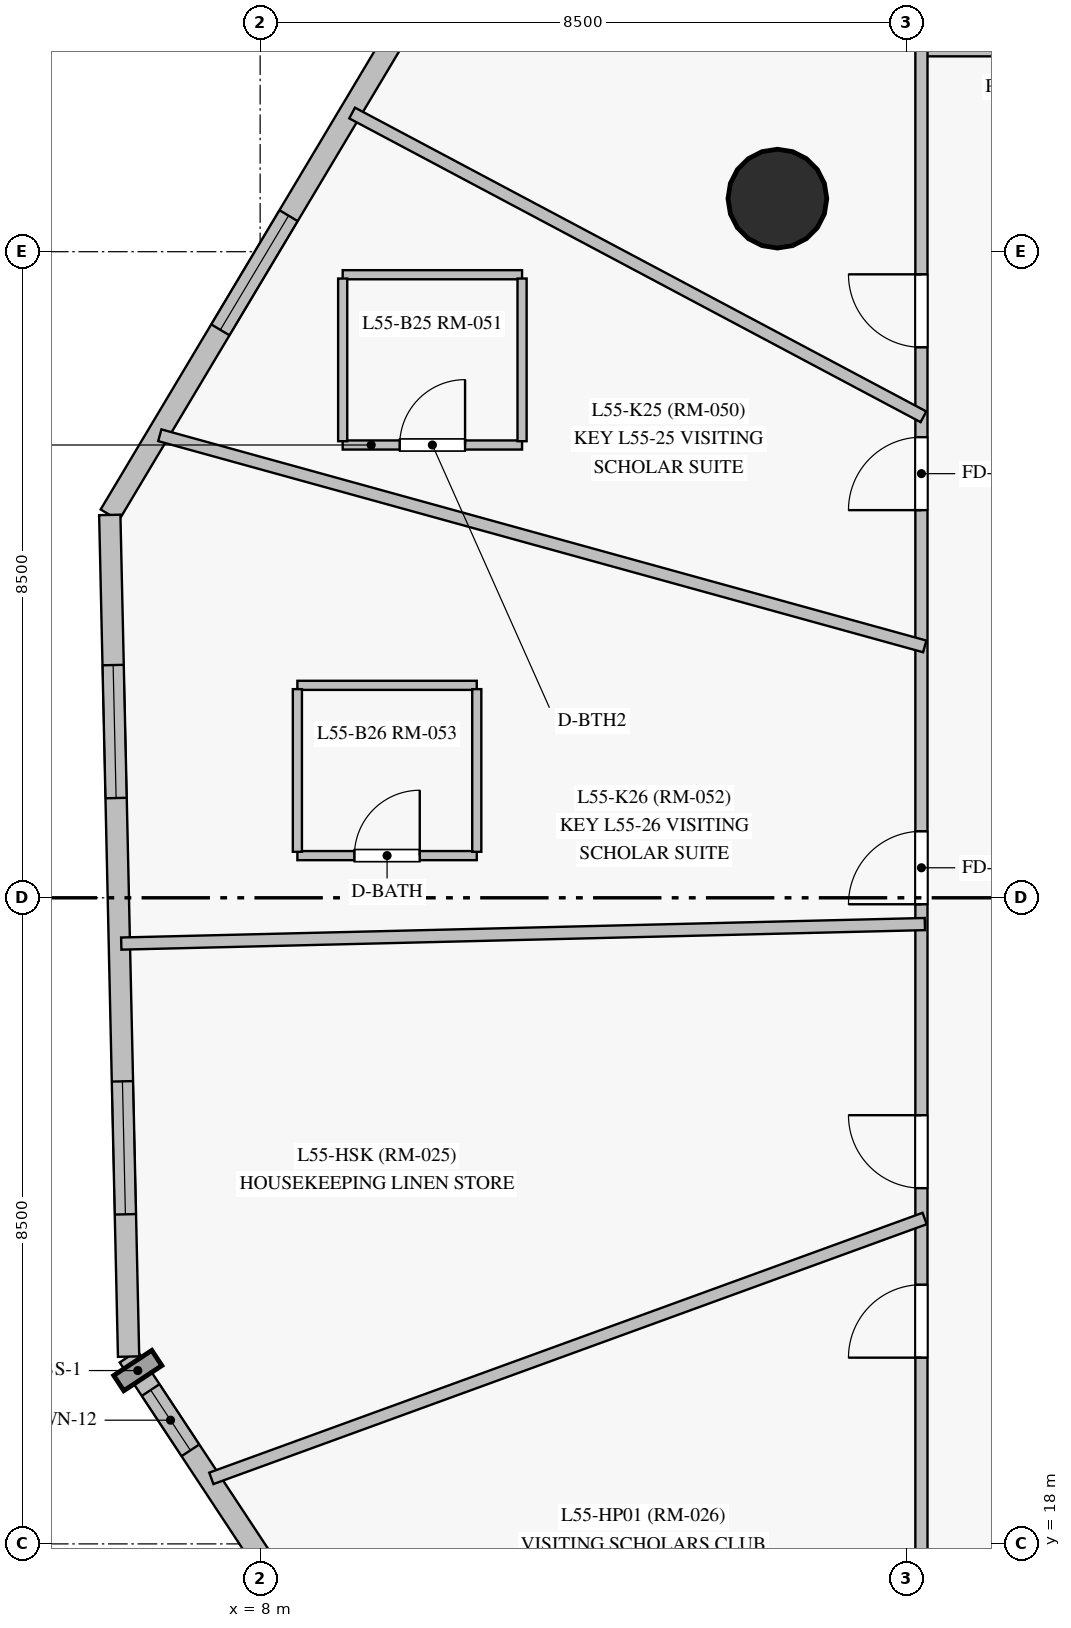
"""IFC4 building model, lengths in metres.
Left out: names, types, materials, properties, quantities, classifications, styles, units other than length and angle.
Written with IfcOpenShell. Run it as: python <this file> out.ifc"""

import sys

from ifc_helpers import new_model, si_unit, direction, frame, frame_2d, origin, origin_with_axes, origin_2d, place, context, subcontext, project, spatial, rectangle, circle, extrude, source, transform, mapped, element, fill, save


model = new_model("IFC4")
c1 = context("Model", 3, precision=1e-05, world=origin(), true_north=direction((0.0, 1.0)))
c2 = subcontext(c1, "Body", "Model", "MODEL_VIEW")
j1 = project(units=[si_unit("LENGTHUNIT", "METRE"), si_unit("PLANEANGLEUNIT", "RADIAN")], contexts=[c1])
p1 = place(None, origin())
s1 = spatial("IfcSite", under=j1, at=p1, CompositionType="ELEMENT")
p2 = place(p1, origin())
s2 = spatial("IfcBuilding", under=s1, at=p2, CompositionType="ELEMENT")
p3 = place(p2, frame((0.0, 0.0, 190.1)))
s3 = spatial("IfcBuildingStorey", under=s2, at=p3, CompositionType="ELEMENT", Elevation=190.1)
m1 = source(origin_with_axes(), c2, "Body", "SweptSolid", [
    extrude(circle(Radius=0.65, at=origin_2d()), origin(), (0.0, 0.0, 1.0), 3.05),
])
p4 = place(p3, frame((14.805, 35.698, 0.0), z_axis=(0.0, 0.0, 1.0), x_axis=(1.0, 0.0, 0.0)))
e1 = element("IfcColumn", 1, at=p4, inside=s3, PredefinedType="COLUMN", context=c2, shape_type="MappedRepresentation", body=[
    mapped(m1, transform((0.0, 0.0, 0.0), scale=1.0)),
])
p5 = place(p3, frame((6.269, 20.464, 0.0), z_axis=(0.0, 0.0, 1.0), x_axis=(0.550716639054, -0.834692268725, 0.0)))
e2 = element("IfcWall", 2, at=p5, inside=s3, PredefinedType="SOLIDWALL", context=c2, shape_type="SweptSolid", body=[
    extrude(rectangle(XDim=14.194, YDim=0.28, at=frame_2d((7.097, 0.0))), origin(), (0.0, 0.0, 1.0), 2.825),
])
p6 = place(p5, frame((0.527, 0.0, 0.85)))
e3 = element("IfcOpeningElement", 3, at=p6, cuts=e2, PredefinedType="OPENING", context=c2, shape_type="SweptSolid", body=[
    extrude(rectangle(XDim=0.95, YDim=1.5, at=frame_2d((0.475, 0.75))), frame((0.0, 0.15, 0.0), z_axis=(0.0, -1.0, 0.0), x_axis=(1.0, 0.0, 0.0)), (0.0, 0.0, 1.0), 0.3),
])
p7 = place(p5, frame((4.5, 0.0, 0.85)))
e4 = element("IfcOpeningElement", 4, at=p7, cuts=e2, PredefinedType="OPENING", context=c2, shape_type="SweptSolid", body=[
    extrude(rectangle(XDim=1.75, YDim=1.65, at=frame_2d((0.875, 0.825))), frame((0.0, 0.15, 0.0), z_axis=(0.0, -1.0, 0.0), x_axis=(1.0, 0.0, 0.0)), (0.0, 0.0, 1.0), 0.3),
])
p8 = place(p5, frame((10.594, 0.0, 0.85)))
e5 = element("IfcOpeningElement", 5, at=p8, cuts=e2, PredefinedType="OPENING", context=c2, shape_type="SweptSolid", body=[
    extrude(rectangle(XDim=1.75, YDim=1.65, at=frame_2d((0.875, 0.825))), frame((0.0, 0.15, 0.0), z_axis=(0.0, -1.0, 0.0), x_axis=(1.0, 0.0, 0.0)), (0.0, 0.0, 1.0), 0.3),
])
p9 = place(p3, frame((13.302, 43.722, 0.0), z_axis=(0.0, 0.0, 1.0), x_axis=(-0.512903816994, -0.858446081308, 0.0)))
e6 = element("IfcWall", 6, at=p9, inside=s3, PredefinedType="SOLIDWALL", context=c2, shape_type="SweptSolid", body=[
    extrude(rectangle(XDim=14.194, YDim=0.28, at=frame_2d((7.097, 0.0))), origin(), (0.0, 0.0, 1.0), 2.825),
])
p10 = place(p9, frame((1.334, 0.0, 0.85)))
e7 = element("IfcOpeningElement", 7, at=p10, cuts=e6, PredefinedType="OPENING", context=c2, shape_type="SweptSolid", body=[
    extrude(rectangle(XDim=1.75, YDim=1.65, at=frame_2d((0.875, 0.825))), frame((0.0, 0.15, 0.0), z_axis=(0.0, -1.0, 0.0), x_axis=(1.0, 0.0, 0.0)), (0.0, 0.0, 1.0), 0.3),
])
p11 = place(p9, frame((4.993, 0.0, 0.85)))
e8 = element("IfcOpeningElement", 8, at=p11, cuts=e6, PredefinedType="OPENING", context=c2, shape_type="SweptSolid", body=[
    extrude(rectangle(XDim=1.75, YDim=1.65, at=frame_2d((0.875, 0.825))), frame((0.0, 0.15, 0.0), z_axis=(0.0, -1.0, 0.0), x_axis=(1.0, 0.0, 0.0)), (0.0, 0.0, 1.0), 0.3),
])
p12 = place(p9, frame((9.608, 0.0, 0.85)))
e9 = element("IfcOpeningElement", 9, at=p12, cuts=e6, PredefinedType="OPENING", context=c2, shape_type="SweptSolid", body=[
    extrude(rectangle(XDim=1.75, YDim=1.65, at=frame_2d((0.875, 0.825))), frame((0.0, 0.15, 0.0), z_axis=(0.0, -1.0, 0.0), x_axis=(1.0, 0.0, 0.0)), (0.0, 0.0, 1.0), 0.3),
])
p13 = place(p3, frame((6.022, 31.537, 0.0), z_axis=(0.0, 0.0, 1.0), x_axis=(0.022351376458, -0.999750176779, 0.0)))
e10 = element("IfcWall", 10, at=p13, inside=s3, PredefinedType="SOLIDWALL", context=c2, shape_type="SweptSolid", body=[
    extrude(rectangle(XDim=11.076, YDim=0.28, at=frame_2d((5.538, 0.0))), origin(), (0.0, 0.0, 1.0), 2.825),
])
p14 = place(p13, frame((1.976, 0.0, 0.85)))
e11 = element("IfcOpeningElement", 11, at=p14, cuts=e10, PredefinedType="OPENING", context=c2, shape_type="SweptSolid", body=[
    extrude(rectangle(XDim=1.75, YDim=1.65, at=frame_2d((0.875, 0.825))), frame((0.0, 0.15, 0.0), z_axis=(0.0, -1.0, 0.0), x_axis=(1.0, 0.0, 0.0)), (0.0, 0.0, 1.0), 0.3),
])
p15 = place(p13, frame((7.454, 0.0, 0.85)))
e12 = element("IfcOpeningElement", 12, at=p15, cuts=e10, PredefinedType="OPENING", context=c2, shape_type="SweptSolid", body=[
    extrude(rectangle(XDim=1.75, YDim=1.65, at=frame_2d((0.875, 0.825))), frame((0.0, 0.15, 0.0), z_axis=(0.0, -1.0, 0.0), x_axis=(1.0, 0.0, 0.0)), (0.0, 0.0, 1.0), 0.3),
])
p16 = place(p3, frame((16.7, 37.65, 0.0), z_axis=(0.0, 0.0, 1.0), x_axis=(1.0, 0.0, 0.0)))
e13 = element("IfcWall", 13, at=p16, inside=s3, PredefinedType="PARTITIONING", context=c2, shape_type="SweptSolid", body=[
    extrude(rectangle(XDim=23.5, YDim=0.16, at=frame_2d((11.75, 0.0))), origin(), (0.0, 0.0, 1.0), 2.375),
])
p17 = place(p16, frame((20.285, 0.0, 0.0)))
e14 = element("IfcOpeningElement", 14, at=p17, cuts=e13, PredefinedType="OPENING", context=c2, shape_type="SweptSolid", body=[
    extrude(rectangle(XDim=0.96, YDim=2.15, at=frame_2d((0.48, 1.075))), frame((0.0, 0.09, 0.0), z_axis=(0.0, -1.0, 0.0), x_axis=(1.0, 0.0, 0.0)), (0.0, 0.0, 1.0), 0.18),
])
p18 = place(p16, frame((16.66, 0.0, 0.0)))
e15 = element("IfcOpeningElement", 15, at=p18, cuts=e13, PredefinedType="OPENING", context=c2, shape_type="SweptSolid", body=[
    extrude(rectangle(XDim=0.96, YDim=2.15, at=frame_2d((0.48, 1.075))), frame((0.0, 0.09, 0.0), z_axis=(0.0, -1.0, 0.0), x_axis=(1.0, 0.0, 0.0)), (0.0, 0.0, 1.0), 0.18),
])
p19 = place(p16, frame((13.863, 0.0, 0.0)))
e16 = element("IfcOpeningElement", 16, at=p19, cuts=e13, PredefinedType="OPENING", context=c2, shape_type="SweptSolid", body=[
    extrude(rectangle(XDim=0.96, YDim=2.15, at=frame_2d((0.48, 1.075))), frame((0.0, 0.09, 0.0), z_axis=(0.0, -1.0, 0.0), x_axis=(1.0, 0.0, 0.0)), (0.0, 0.0, 1.0), 0.18),
])
p20 = place(p16, frame((11.965, 0.0, 0.0)))
e17 = element("IfcOpeningElement", 17, at=p20, cuts=e13, PredefinedType="OPENING", context=c2, shape_type="SweptSolid", body=[
    extrude(rectangle(XDim=0.96, YDim=2.15, at=frame_2d((0.48, 1.075))), frame((0.0, 0.09, 0.0), z_axis=(0.0, -1.0, 0.0), x_axis=(1.0, 0.0, 0.0)), (0.0, 0.0, 1.0), 0.18),
])
p21 = place(p16, frame((10.215, 0.0, 0.0)))
e18 = element("IfcOpeningElement", 18, at=p21, cuts=e13, PredefinedType="OPENING", context=c2, shape_type="SweptSolid", body=[
    extrude(rectangle(XDim=0.96, YDim=2.15, at=frame_2d((0.48, 1.075))), frame((0.0, 0.09, 0.0), z_axis=(0.0, -1.0, 0.0), x_axis=(1.0, 0.0, 0.0)), (0.0, 0.0, 1.0), 0.18),
])
p22 = place(p16, frame((8.14, 0.0, 0.0)))
e19 = element("IfcOpeningElement", 19, at=p22, cuts=e13, PredefinedType="OPENING", context=c2, shape_type="SweptSolid", body=[
    extrude(rectangle(XDim=0.96, YDim=2.15, at=frame_2d((0.48, 1.075))), frame((0.0, 0.09, 0.0), z_axis=(0.0, -1.0, 0.0), x_axis=(1.0, 0.0, 0.0)), (0.0, 0.0, 1.0), 0.18),
])
p23 = place(p16, frame((5.54, 0.0, 0.0)))
e20 = element("IfcOpeningElement", 20, at=p23, cuts=e13, PredefinedType="OPENING", context=c2, shape_type="SweptSolid", body=[
    extrude(rectangle(XDim=0.96, YDim=2.15, at=frame_2d((0.48, 1.075))), frame((0.0, 0.09, 0.0), z_axis=(0.0, -1.0, 0.0), x_axis=(1.0, 0.0, 0.0)), (0.0, 0.0, 1.0), 0.18),
])
p24 = place(p16, frame((3.377, 0.0, 0.0)))
e21 = element("IfcOpeningElement", 21, at=p24, cuts=e13, PredefinedType="OPENING", context=c2, shape_type="SweptSolid", body=[
    extrude(rectangle(XDim=0.96, YDim=2.15, at=frame_2d((0.48, 1.075))), frame((0.0, 0.09, 0.0), z_axis=(0.0, -1.0, 0.0), x_axis=(1.0, 0.0, 0.0)), (0.0, 0.0, 1.0), 0.18),
])
p25 = place(p3, frame((16.7, 15.35, 0.0), z_axis=(0.0, 0.0, 1.0), x_axis=(0.0, 1.0, 0.0)))
e22 = element("IfcWall", 22, at=p25, inside=s3, PredefinedType="PARTITIONING", context=c2, shape_type="SweptSolid", body=[
    extrude(rectangle(XDim=22.3, YDim=0.16, at=frame_2d((11.15, 0.0))), origin(), (0.0, 0.0, 1.0), 2.275),
])
p26 = place(p25, frame((16.25, 0.0, 0.0)))
e23 = element("IfcOpeningElement", 23, at=p26, cuts=e22, PredefinedType="OPENING", context=c2, shape_type="SweptSolid", body=[
    extrude(rectangle(XDim=0.96, YDim=2.15, at=frame_2d((0.48, 1.075))), frame((0.0, 0.09, 0.0), z_axis=(0.0, -1.0, 0.0), x_axis=(1.0, 0.0, 0.0)), (0.0, 0.0, 1.0), 0.18),
])
p27 = place(p25, frame((11.065, 0.0, 0.0)))
e24 = element("IfcOpeningElement", 24, at=p27, cuts=e22, PredefinedType="OPENING", context=c2, shape_type="SweptSolid", body=[
    extrude(rectangle(XDim=0.96, YDim=2.15, at=frame_2d((0.48, 1.075))), frame((0.0, 0.09, 0.0), z_axis=(0.0, -1.0, 0.0), x_axis=(1.0, 0.0, 0.0)), (0.0, 0.0, 1.0), 0.18),
])
p28 = place(p25, frame((7.33, 0.0, 0.0)))
e25 = element("IfcOpeningElement", 25, at=p28, cuts=e22, PredefinedType="OPENING", context=c2, shape_type="SweptSolid", body=[
    extrude(rectangle(XDim=0.96, YDim=2.15, at=frame_2d((0.48, 1.075))), frame((0.0, 0.09, 0.0), z_axis=(0.0, -1.0, 0.0), x_axis=(1.0, 0.0, 0.0)), (0.0, 0.0, 1.0), 0.18),
])
p29 = place(p25, frame((5.1, 0.0, 0.0)))
e26 = element("IfcOpeningElement", 26, at=p29, cuts=e22, PredefinedType="OPENING", context=c2, shape_type="SweptSolid", body=[
    extrude(rectangle(XDim=0.96, YDim=2.15, at=frame_2d((0.48, 1.075))), frame((0.0, 0.09, 0.0), z_axis=(0.0, -1.0, 0.0), x_axis=(1.0, 0.0, 0.0)), (0.0, 0.0, 1.0), 0.18),
])
p30 = place(p25, frame((18.392, 0.0, 0.0)))
e27 = element("IfcOpeningElement", 27, at=p30, cuts=e22, PredefinedType="OPENING", context=c2, shape_type="SweptSolid", body=[
    extrude(rectangle(XDim=0.96, YDim=2.15, at=frame_2d((0.48, 1.075))), frame((0.0, 0.09, 0.0), z_axis=(0.0, -1.0, 0.0), x_axis=(1.0, 0.0, 0.0)), (0.0, 0.0, 1.0), 0.18),
])
p31 = place(p3, frame((6.173, 25.898, 0.0), z_axis=(0.0, 0.0, 1.0), x_axis=(0.999705046688, 0.024286202409, 0.0)))
e28 = element("IfcWall", 28, at=p31, inside=s3, PredefinedType="PARTITIONING", context=c2, shape_type="SweptSolid", body=[
    extrude(rectangle(XDim=10.575, YDim=0.16, at=frame_2d((5.288, 0.0))), origin(), (0.0, 0.0, 1.0), 2.825),
])
p32 = place(p3, frame((16.743, 29.807, 0.0), z_axis=(0.0, 0.0, 1.0), x_axis=(-0.963952503932, 0.266074369611, 0.0)))
e29 = element("IfcWall", 29, at=p32, inside=s3, PredefinedType="PARTITIONING", context=c2, shape_type="SweptSolid", body=[
    extrude(rectangle(XDim=10.44, YDim=0.16, at=frame_2d((5.22, 0.0))), origin(), (0.0, 0.0, 1.0), 2.825),
])
p33 = place(p3, frame((16.742, 22.281, 0.0), z_axis=(0.0, 0.0, 1.0), x_axis=(-0.939600572321, -0.342272938593, 0.0)))
e30 = element("IfcWall", 30, at=p33, inside=s3, PredefinedType="PARTITIONING", context=c2, shape_type="SweptSolid", body=[
    extrude(rectangle(XDim=9.988, YDim=0.16, at=frame_2d((4.994, 0.0))), origin(), (0.0, 0.0, 1.0), 2.825),
])
p34 = place(p3, frame((22.0, 37.611, 0.0), z_axis=(0.0, 0.0, 1.0), x_axis=(-0.508928084583, 0.8608090408, 0.0)))
e31 = element("IfcWall", 31, at=p34, inside=s3, PredefinedType="PARTITIONING", context=c2, shape_type="SweptSolid", body=[
    extrude(rectangle(XDim=9.931, YDim=0.16, at=frame_2d((4.965, 0.0))), origin(), (0.0, 0.0, 1.0), 2.825),
])
p35 = place(p3, frame((16.727, 32.828, 0.0), z_axis=(0.0, 0.0, 1.0), x_axis=(-0.882944481413, 0.469477414517, 0.0)))
e32 = element("IfcWall", 32, at=p35, inside=s3, PredefinedType="PARTITIONING", context=c2, shape_type="SweptSolid", body=[
    extrude(rectangle(XDim=8.513, YDim=0.16, at=frame_2d((4.256, 0.0))), origin(), (0.0, 0.0, 1.0), 2.825),
])
p36 = place(p3, frame((19.408, 37.615, 0.0), z_axis=(0.0, 0.0, 1.0), x_axis=(-0.636333777541, 0.771413847141, 0.0)))
e33 = element("IfcWall", 33, at=p36, inside=s3, PredefinedType="PARTITIONING", context=c2, shape_type="SweptSolid", body=[
    extrude(rectangle(XDim=8.493, YDim=0.16, at=frame_2d((4.247, 0.0))), origin(), (0.0, 0.0, 1.0), 2.825),
])
p37 = place(p3, frame((9.086, 32.457, 0.0), z_axis=(0.0, 0.0, 1.0), x_axis=(1.0, 0.0, 0.0)))
e34 = element("IfcWall", 34, at=p37, inside=s3, PredefinedType="PARTITIONING", context=c2, shape_type="SweptSolid", body=[
    extrude(rectangle(XDim=2.36, YDim=0.12, at=frame_2d((1.18, 0.0))), origin(), (0.0, 0.0, 1.0), 2.825),
])
p38 = place(p37, frame((0.75, 0.0, 0.0)))
e35 = element("IfcOpeningElement", 35, at=p38, cuts=e34, PredefinedType="OPENING", context=c2, shape_type="SweptSolid", body=[
    extrude(rectangle(XDim=0.86, YDim=2.04, at=frame_2d((0.43, 1.02))), frame((0.0, 0.07, 0.0), z_axis=(0.0, -1.0, 0.0), x_axis=(1.0, 0.0, 0.0)), (0.0, 0.0, 1.0), 0.14),
])
p39 = place(p3, frame((11.446, 34.697, 0.0), z_axis=(0.0, 0.0, 1.0), x_axis=(-1.0, 0.0, 0.0)))
e36 = element("IfcWall", 36, at=p39, inside=s3, PredefinedType="PARTITIONING", context=c2, shape_type="SweptSolid", body=[
    extrude(rectangle(XDim=2.36, YDim=0.12, at=frame_2d((1.18, 0.0))), origin(), (0.0, 0.0, 1.0), 2.825),
])
p40 = place(p3, frame((8.49, 27.055, 0.0), z_axis=(0.0, 0.0, 1.0), x_axis=(1.0, 0.0, 0.0)))
e37 = element("IfcWall", 37, at=p40, inside=s3, PredefinedType="PARTITIONING", context=c2, shape_type="SweptSolid", body=[
    extrude(rectangle(XDim=2.36, YDim=0.12, at=frame_2d((1.18, 0.0))), origin(), (0.0, 0.0, 1.0), 2.825),
])
p41 = place(p40, frame((0.75, 0.0, 0.0)))
e38 = element("IfcOpeningElement", 38, at=p41, cuts=e37, PredefinedType="OPENING", context=c2, shape_type="SweptSolid", body=[
    extrude(rectangle(XDim=0.86, YDim=2.1, at=frame_2d((0.43, 1.05))), frame((0.0, 0.07, 0.0), z_axis=(0.0, -1.0, 0.0), x_axis=(1.0, 0.0, 0.0)), (0.0, 0.0, 1.0), 0.14),
])
p42 = place(p3, frame((10.85, 29.295, 0.0), z_axis=(0.0, 0.0, 1.0), x_axis=(-1.0, 0.0, 0.0)))
e39 = element("IfcWall", 39, at=p42, inside=s3, PredefinedType="PARTITIONING", context=c2, shape_type="SweptSolid", body=[
    extrude(rectangle(XDim=2.36, YDim=0.12, at=frame_2d((1.18, 0.0))), origin(), (0.0, 0.0, 1.0), 2.825),
])
for number, where, z_axis, x_axis in (
    (40, (11.446, 32.507, 0.0), (0.0, 0.0, 1.0), (0.0, 1.0, 0.0)),
    (41, (9.086, 34.647, 0.0), (0.0, 0.0, 1.0), (0.0, -1.0, 0.0)),
):
    element("IfcWall", number, at=place(p3, frame(where, z_axis=z_axis, x_axis=x_axis)), inside=s3, PredefinedType="PARTITIONING", context=c2, shape_type="SweptSolid", body=[
        extrude(rectangle(XDim=2.14, YDim=0.12, at=frame_2d((1.07, 0.0))), origin(), (0.0, 0.0, 1.0), 2.825),
    ])
for number, where, z_axis, x_axis in (
    (42, (10.85, 27.105, 0.0), (0.0, 0.0, 1.0), (0.0, 1.0, 0.0)),
    (43, (8.49, 29.245, 0.0), (0.0, 0.0, 1.0), (0.0, -1.0, 0.0)),
):
    element("IfcWall", number, at=place(p3, frame(where, z_axis=z_axis, x_axis=x_axis)), inside=s3, PredefinedType="PARTITIONING", context=c2, shape_type="SweptSolid", body=[
        extrude(rectangle(XDim=2.14, YDim=0.12, at=frame_2d((1.07, 0.0))), origin(), (0.0, 0.0, 1.0), 2.825),
    ])
m2 = source(origin_with_axes(), c2, "Body", "SweptSolid", [
    extrude(rectangle(XDim=0.95, YDim=1.5, at=frame_2d((0.475, 0.75))), frame((0.0, 0.03, 0.0), z_axis=(0.0, -1.0, 0.0), x_axis=(1.0, 0.0, 0.0)), (0.0, 0.0, 1.0), 0.06),
])
p43 = place(p6, origin())
e44 = element("IfcWindow", 44, at=p43, inside=s3, PartitioningType="SINGLE_PANEL", PredefinedType="WINDOW", context=c2, shape_type="MappedRepresentation", body=[
    mapped(m2, transform((0.0, 0.0, 0.0), scale=1.0)),
])
fill(e3, e44)
m3 = source(origin_with_axes(), c2, "Body", "SweptSolid", [
    extrude(rectangle(XDim=1.75, YDim=1.65, at=frame_2d((0.875, 0.825))), frame((0.0, 0.03, 0.0), z_axis=(0.0, -1.0, 0.0), x_axis=(1.0, 0.0, 0.0)), (0.0, 0.0, 1.0), 0.06),
])
p44 = place(p12, origin())
e45 = element("IfcWindow", 45, at=p44, inside=s3, PartitioningType="SINGLE_PANEL", PredefinedType="WINDOW", context=c2, shape_type="MappedRepresentation", body=[
    mapped(m3, transform((0.0, 0.0, 0.0), scale=1.0)),
])
fill(e9, e45)
p45 = place(p14, origin())
e46 = element("IfcWindow", 46, at=p45, inside=s3, PartitioningType="SINGLE_PANEL", PredefinedType="WINDOW", context=c2, shape_type="MappedRepresentation", body=[
    mapped(m3, transform((0.0, 0.0, 0.0), scale=1.0)),
])
fill(e11, e46)
p46 = place(p15, origin())
e47 = element("IfcWindow", 47, at=p46, inside=s3, PartitioningType="SINGLE_PANEL", PredefinedType="WINDOW", context=c2, shape_type="MappedRepresentation", body=[
    mapped(m3, transform((0.0, 0.0, 0.0), scale=1.0)),
])
fill(e12, e47)
m4 = source(origin_with_axes(), c2, "Body", "SweptSolid", [
    extrude(rectangle(XDim=0.86, YDim=2.04, at=frame_2d((0.43, 1.02))), frame((0.0, 0.025, 0.0), z_axis=(0.0, -1.0, 0.0), x_axis=(1.0, 0.0, 0.0)), (0.0, 0.0, 1.0), 0.05),
])
p47 = place(p38, origin())
e48 = element("IfcDoor", 48, at=p47, inside=s3, OperationType="SINGLE_SWING_RIGHT", PredefinedType="DOOR", context=c2, shape_type="MappedRepresentation", body=[
    mapped(m4, transform((0.0, 0.0, 0.0), scale=1.0)),
])
fill(e35, e48)
m5 = source(origin_with_axes(), c2, "Body", "SweptSolid", [
    extrude(rectangle(XDim=0.96, YDim=2.15, at=frame_2d((0.48, 1.075))), frame((0.0, 0.025, 0.0), z_axis=(0.0, -1.0, 0.0), x_axis=(1.0, 0.0, 0.0)), (0.0, 0.0, 1.0), 0.05),
])
p48 = place(p26, origin())
e49 = element("IfcDoor", 49, at=p48, inside=s3, OperationType="SINGLE_SWING_LEFT", PredefinedType="DOOR", context=c2, shape_type="MappedRepresentation", body=[
    mapped(m5, transform((0.0, 0.0, 0.0), scale=1.0)),
])
fill(e23, e49)
m6 = source(origin_with_axes(), c2, "Body", "SweptSolid", [
    extrude(rectangle(XDim=0.86, YDim=2.1, at=frame_2d((0.43, 1.05))), frame((0.0, 0.025, 0.0), z_axis=(0.0, -1.0, 0.0), x_axis=(1.0, 0.0, 0.0)), (0.0, 0.0, 1.0), 0.05),
])
p49 = place(p41, origin())
e50 = element("IfcDoor", 50, at=p49, inside=s3, OperationType="SINGLE_SWING_RIGHT", PredefinedType="DOOR", context=c2, shape_type="MappedRepresentation", body=[
    mapped(m6, transform((0.0, 0.0, 0.0), scale=1.0)),
])
fill(e38, e50)
p50 = place(p27, origin())
e51 = element("IfcDoor", 51, at=p50, inside=s3, OperationType="SINGLE_SWING_LEFT", PredefinedType="DOOR", context=c2, shape_type="MappedRepresentation", body=[
    mapped(m5, transform((0.0, 0.0, 0.0), scale=1.0)),
])
fill(e24, e51)
p51 = place(p28, origin())
e52 = element("IfcDoor", 52, at=p51, inside=s3, OperationType="SINGLE_SWING_RIGHT", PredefinedType="DOOR", context=c2, shape_type="MappedRepresentation", body=[
    mapped(m5, transform((0.0, 0.0, 0.0), scale=1.0)),
])
fill(e25, e52)
p52 = place(p29, origin())
e53 = element("IfcDoor", 53, at=p52, inside=s3, OperationType="SINGLE_SWING_LEFT", PredefinedType="DOOR", context=c2, shape_type="MappedRepresentation", body=[
    mapped(m5, transform((0.0, 0.0, 0.0), scale=1.0)),
])
fill(e26, e53)
p53 = place(p30, origin())
e54 = element("IfcDoor", 54, at=p53, inside=s3, OperationType="SINGLE_SWING_RIGHT", PredefinedType="DOOR", context=c2, shape_type="MappedRepresentation", body=[
    mapped(m5, transform((0.0, 0.0, 0.0), scale=1.0)),
])
fill(e27, e54)
save(model, sys.argv[1])
